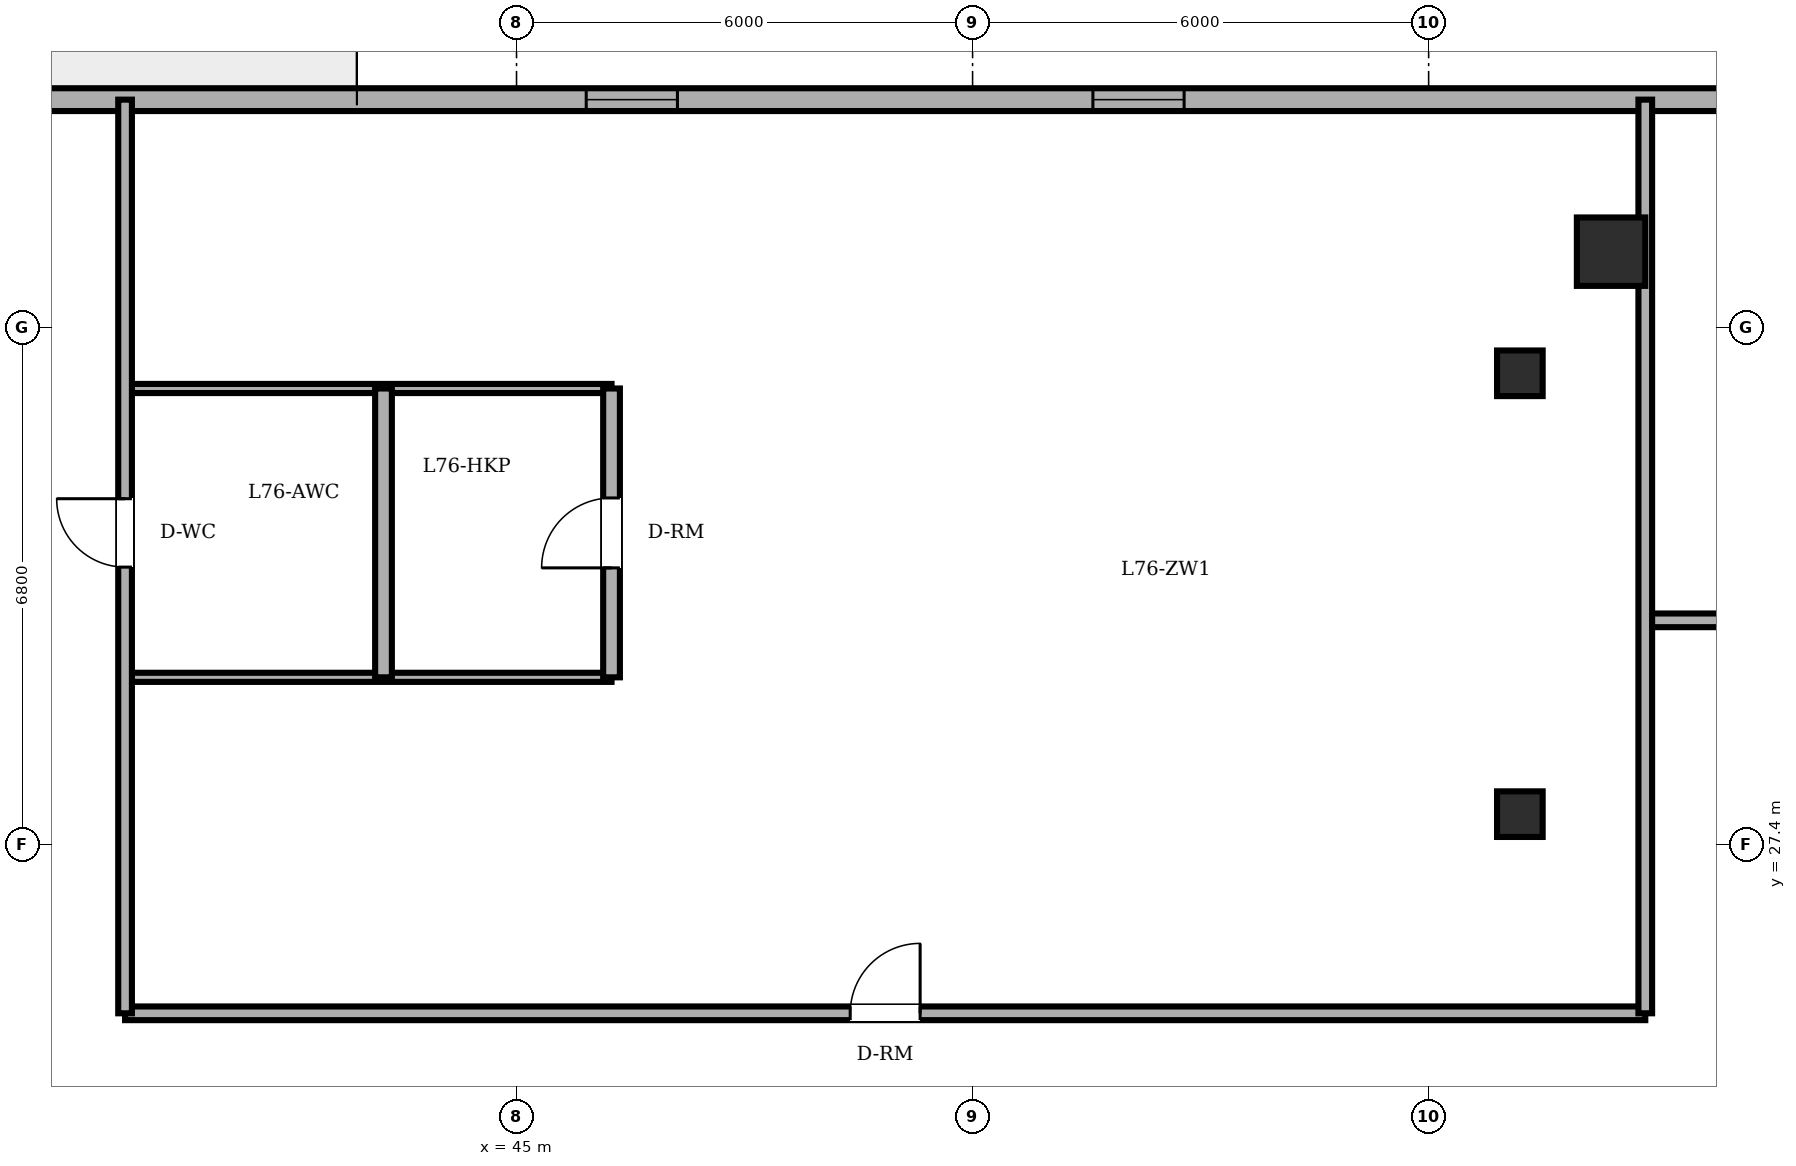
"""IFC4 building model, lengths in metres.
Left out: names, types, materials, properties, quantities, classifications, styles, units other than length and angle.
Written with IfcOpenShell. Run it as: python <this file> out.ifc"""

import sys

from ifc_helpers import new_model, si_unit, direction, frame, frame_2d, origin, origin_2d, place, context, subcontext, project, spatial, rectangle, circle, extrude, element, fill, save


model = new_model("IFC4")
c1 = context("Model", 3, precision=1e-05, world=origin(), true_north=direction((0.0, 1.0)))
c2 = subcontext(c1, "Body", "Model", "MODEL_VIEW")
j1 = project(units=[si_unit("LENGTHUNIT", "METRE"), si_unit("PLANEANGLEUNIT", "RADIAN")], contexts=[c1])
p1 = place(None, origin())
s1 = spatial("IfcSite", under=j1, at=p1, CompositionType="ELEMENT")
p2 = place(p1, origin())
s2 = spatial("IfcBuilding", under=s1, at=p2, CompositionType="ELEMENT")
p3 = place(p2, frame((0.0, 0.0, 291.65)))
s3 = spatial("IfcBuildingStorey", under=s2, at=p3, CompositionType="ELEMENT", Elevation=291.65)
p4 = place(p3, frame((59.4, 35.2, 0.0), z_axis=(0.0, 0.0, 1.0), x_axis=(1.0, 0.0, 0.0)))
e1 = element("IfcColumn", 1, at=p4, inside=s3, PredefinedType="COLUMN", context=c2, shape_type="SweptSolid", body=[
    extrude(circle(Radius=0.45, at=origin_2d()), origin(), (0.0, 0.0, 1.0), 3.65),
])
for number, where, z_axis, x_axis in (
    (2, (58.2, 27.8, 0.0), (0.0, 0.0, 1.0), (1.0, 0.0, 0.0)),
    (3, (58.2, 33.6, 0.0), (0.0, 0.0, 1.0), (1.0, 0.0, 0.0)),
):
    element("IfcColumn", number, at=place(p3, frame(where, z_axis=z_axis, x_axis=x_axis)), inside=s3, PredefinedType="COLUMN", context=c2, shape_type="SweptSolid", body=[
        extrude(rectangle(XDim=0.6, YDim=0.6, at=origin_2d()), origin(), (0.0, 0.0, 1.0), 3.65),
    ])
p5 = place(p3, frame((61.03, 37.2, 0.0), z_axis=(0.0, 0.0, 1.0), x_axis=(-1.0, 0.0, 0.0)))
e4 = element("IfcWall", 4, at=p5, inside=s3, PredefinedType="SOLIDWALL", context=c2, shape_type="SweptSolid", body=[
    extrude(rectangle(XDim=37.03, YDim=0.3, at=frame_2d((18.515, 0.0))), origin(), (0.0, 0.0, 1.0), 3.41),
])
p6 = place(p5, frame((31.155, 0.0, 0.0)))
e5 = element("IfcOpeningElement", 5, at=p6, cuts=e4, PredefinedType="OPENING", context=c2, shape_type="SweptSolid", body=[
    extrude(rectangle(XDim=0.95, YDim=2.2, at=frame_2d((0.475, 1.1))), frame((0.0, 0.16, 0.0), z_axis=(0.0, -1.0, 0.0), x_axis=(1.0, 0.0, 0.0)), (0.0, 0.0, 1.0), 0.32),
])
p7 = place(p5, frame((7.247, 0.0, 0.85)))
e6 = element("IfcOpeningElement", 6, at=p7, cuts=e4, PredefinedType="OPENING", context=c2, shape_type="SweptSolid", body=[
    extrude(rectangle(XDim=1.2, YDim=1.6, at=frame_2d((0.6, 0.8))), frame((0.0, 0.16, 0.0), z_axis=(0.0, -1.0, 0.0), x_axis=(1.0, 0.0, 0.0)), (0.0, 0.0, 1.0), 0.32),
])
p8 = place(p5, frame((13.913, 0.0, 0.85)))
e7 = element("IfcOpeningElement", 7, at=p8, cuts=e4, PredefinedType="OPENING", context=c2, shape_type="SweptSolid", body=[
    extrude(rectangle(XDim=1.2, YDim=1.6, at=frame_2d((0.6, 0.8))), frame((0.0, 0.16, 0.0), z_axis=(0.0, -1.0, 0.0), x_axis=(1.0, 0.0, 0.0)), (0.0, 0.0, 1.0), 0.32),
])
p9 = place(p5, frame((25.747, 0.0, 0.85)))
e8 = element("IfcOpeningElement", 8, at=p9, cuts=e4, PredefinedType="OPENING", context=c2, shape_type="SweptSolid", body=[
    extrude(rectangle(XDim=1.2, YDim=1.6, at=frame_2d((0.6, 0.8))), frame((0.0, 0.16, 0.0), z_axis=(0.0, -1.0, 0.0), x_axis=(1.0, 0.0, 0.0)), (0.0, 0.0, 1.0), 0.32),
])
p10 = place(p3, frame((39.85, 25.18, 0.0), z_axis=(0.0, 0.0, 1.0), x_axis=(1.0, 0.0, 0.0)))
e9 = element("IfcWall", 9, at=p10, inside=s3, PredefinedType="PARTITIONING", context=c2, shape_type="SweptSolid", body=[
    extrude(rectangle(XDim=20.0, YDim=0.18, at=frame_2d((10.0, 0.0))), origin(), (0.0, 0.0, 1.0), 3.41),
])
p11 = place(p10, frame((9.54, 0.0, 0.0)))
e10 = element("IfcOpeningElement", 10, at=p11, cuts=e9, PredefinedType="OPENING", context=c2, shape_type="SweptSolid", body=[
    extrude(rectangle(XDim=0.92, YDim=2.1, at=frame_2d((0.46, 1.05))), frame((0.0, 0.1, 0.0), z_axis=(0.0, -1.0, 0.0), x_axis=(1.0, 0.0, 0.0)), (0.0, 0.0, 1.0), 0.2),
])
p12 = place(p3, frame((39.85, 29.6, 0.0), z_axis=(0.0, 0.0, 1.0), x_axis=(1.0, 0.0, 0.0)))
e11 = element("IfcWall", 11, at=p12, inside=s3, PredefinedType="PARTITIONING", context=c2, shape_type="SweptSolid", body=[
    extrude(rectangle(XDim=6.4, YDim=0.12, at=frame_2d((3.2, 0.0))), origin(), (0.0, 0.0, 1.0), 3.41),
])
p13 = place(p3, frame((59.85, 30.35, 0.0), z_axis=(0.0, 0.0, 1.0), x_axis=(1.0, 0.0, 0.0)))
e12 = element("IfcWall", 12, at=p13, inside=s3, PredefinedType="PARTITIONING", context=c2, shape_type="SweptSolid", body=[
    extrude(rectangle(XDim=15.139, YDim=0.18, at=frame_2d((7.569, 0.0))), origin(), (0.0, 0.0, 1.0), 3.41),
])
p14 = place(p13, frame((0.975, 0.0, 0.0)))
e13 = element("IfcOpeningElement", 13, at=p14, cuts=e12, PredefinedType="OPENING", context=c2, shape_type="SweptSolid", body=[
    extrude(rectangle(XDim=0.92, YDim=2.1, at=frame_2d((0.46, 1.05))), frame((0.0, 0.1, 0.0), z_axis=(0.0, -1.0, 0.0), x_axis=(1.0, 0.0, 0.0)), (0.0, 0.0, 1.0), 0.2),
])
p15 = place(p3, frame((39.85, 33.4, 0.0), z_axis=(0.0, 0.0, 1.0), x_axis=(1.0, 0.0, 0.0)))
e14 = element("IfcWall", 14, at=p15, inside=s3, PredefinedType="PARTITIONING", context=c2, shape_type="SweptSolid", body=[
    extrude(rectangle(XDim=6.4, YDim=0.12, at=frame_2d((3.2, 0.0))), origin(), (0.0, 0.0, 1.0), 3.052),
])
p16 = place(p3, frame((39.85, 25.18, 0.0), z_axis=(0.0, 0.0, 1.0), x_axis=(0.0, 1.0, 0.0)))
e15 = element("IfcWall", 15, at=p16, inside=s3, PredefinedType="PARTITIONING", context=c2, shape_type="SweptSolid", body=[
    extrude(rectangle(XDim=12.02, YDim=0.18, at=frame_2d((6.01, 0.0))), origin(), (0.0, 0.0, 1.0), 3.41),
])
p17 = place(p16, frame((5.87, 0.0, 0.0)))
e16 = element("IfcOpeningElement", 16, at=p17, cuts=e15, PredefinedType="OPENING", context=c2, shape_type="SweptSolid", body=[
    extrude(rectangle(XDim=0.9, YDim=2.1, at=frame_2d((0.45, 1.05))), frame((0.0, 0.1, 0.0), z_axis=(0.0, -1.0, 0.0), x_axis=(1.0, 0.0, 0.0)), (0.0, 0.0, 1.0), 0.2),
])
p18 = place(p3, frame((43.25, 29.6, 0.0), z_axis=(0.0, 0.0, 1.0), x_axis=(0.0, 1.0, 0.0)))
e17 = element("IfcWall", 17, at=p18, inside=s3, PredefinedType="PARTITIONING", context=c2, shape_type="SweptSolid", body=[
    extrude(rectangle(XDim=3.8, YDim=0.22, at=frame_2d((1.9, 0.0))), origin(), (0.0, 0.0, 1.0), 3.41),
])
p19 = place(p3, frame((46.25, 29.6, 0.0), z_axis=(0.0, 0.0, 1.0), x_axis=(0.0, 1.0, 0.0)))
e18 = element("IfcWall", 18, at=p19, inside=s3, PredefinedType="PARTITIONING", context=c2, shape_type="SweptSolid", body=[
    extrude(rectangle(XDim=3.8, YDim=0.22, at=frame_2d((1.9, 0.0))), origin(), (0.0, 0.0, 1.0), 3.41),
])
p20 = place(p19, frame((1.44, 0.0, 0.0)))
e19 = element("IfcOpeningElement", 19, at=p20, cuts=e18, PredefinedType="OPENING", context=c2, shape_type="SweptSolid", body=[
    extrude(rectangle(XDim=0.92, YDim=2.1, at=frame_2d((0.46, 1.05))), frame((0.0, 0.12, 0.0), z_axis=(0.0, -1.0, 0.0), x_axis=(1.0, 0.0, 0.0)), (0.0, 0.0, 1.0), 0.24),
])
p21 = place(p3, frame((59.85, 25.18, 0.0), z_axis=(0.0, 0.0, 1.0), x_axis=(0.0, 1.0, 0.0)))
e20 = element("IfcWall", 20, at=p21, inside=s3, PredefinedType="PARTITIONING", context=c2, shape_type="SweptSolid", body=[
    extrude(rectangle(XDim=12.02, YDim=0.18, at=frame_2d((6.01, 0.0))), origin(), (0.0, 0.0, 1.0), 3.41),
])
p22 = place(p7, origin())
e21 = element("IfcWindow", 21, at=p22, inside=s3, PartitioningType="SINGLE_PANEL", PredefinedType="WINDOW", context=c2, shape_type="SweptSolid", body=[
    extrude(rectangle(XDim=1.2, YDim=1.6, at=frame_2d((0.6, 0.8))), frame((0.0, 0.03, 0.0), z_axis=(0.0, -1.0, 0.0), x_axis=(1.0, 0.0, 0.0)), (0.0, 0.0, 1.0), 0.06),
])
fill(e6, e21)
p23 = place(p8, origin())
e22 = element("IfcWindow", 22, at=p23, inside=s3, PartitioningType="SINGLE_PANEL", PredefinedType="WINDOW", context=c2, shape_type="SweptSolid", body=[
    extrude(rectangle(XDim=1.2, YDim=1.6, at=frame_2d((0.6, 0.8))), frame((0.0, 0.03, 0.0), z_axis=(0.0, -1.0, 0.0), x_axis=(1.0, 0.0, 0.0)), (0.0, 0.0, 1.0), 0.06),
])
fill(e7, e22)
p24 = place(p17, origin())
e23 = element("IfcDoor", 23, at=p24, inside=s3, OperationType="SINGLE_SWING_RIGHT", PredefinedType="DOOR", context=c2, shape_type="SweptSolid", body=[
    extrude(rectangle(XDim=0.9, YDim=2.1, at=frame_2d((0.45, 1.05))), frame((0.0, 0.025, 0.0), z_axis=(0.0, -1.0, 0.0), x_axis=(1.0, 0.0, 0.0)), (0.0, 0.0, 1.0), 0.05),
])
fill(e16, e23)
p25 = place(p11, origin())
e24 = element("IfcDoor", 24, at=p25, inside=s3, OperationType="SINGLE_SWING_RIGHT", PredefinedType="DOOR", context=c2, shape_type="SweptSolid", body=[
    extrude(rectangle(XDim=0.92, YDim=2.1, at=frame_2d((0.46, 1.05))), frame((0.0, 0.025, 0.0), z_axis=(0.0, -1.0, 0.0), x_axis=(1.0, 0.0, 0.0)), (0.0, 0.0, 1.0), 0.05),
])
fill(e10, e24)
p26 = place(p20, origin())
e25 = element("IfcDoor", 25, at=p26, inside=s3, OperationType="SINGLE_SWING_LEFT", PredefinedType="DOOR", context=c2, shape_type="SweptSolid", body=[
    extrude(rectangle(XDim=0.92, YDim=2.1, at=frame_2d((0.46, 1.05))), frame((0.0, 0.025, 0.0), z_axis=(0.0, -1.0, 0.0), x_axis=(1.0, 0.0, 0.0)), (0.0, 0.0, 1.0), 0.05),
])
fill(e19, e25)
save(model, sys.argv[1])
